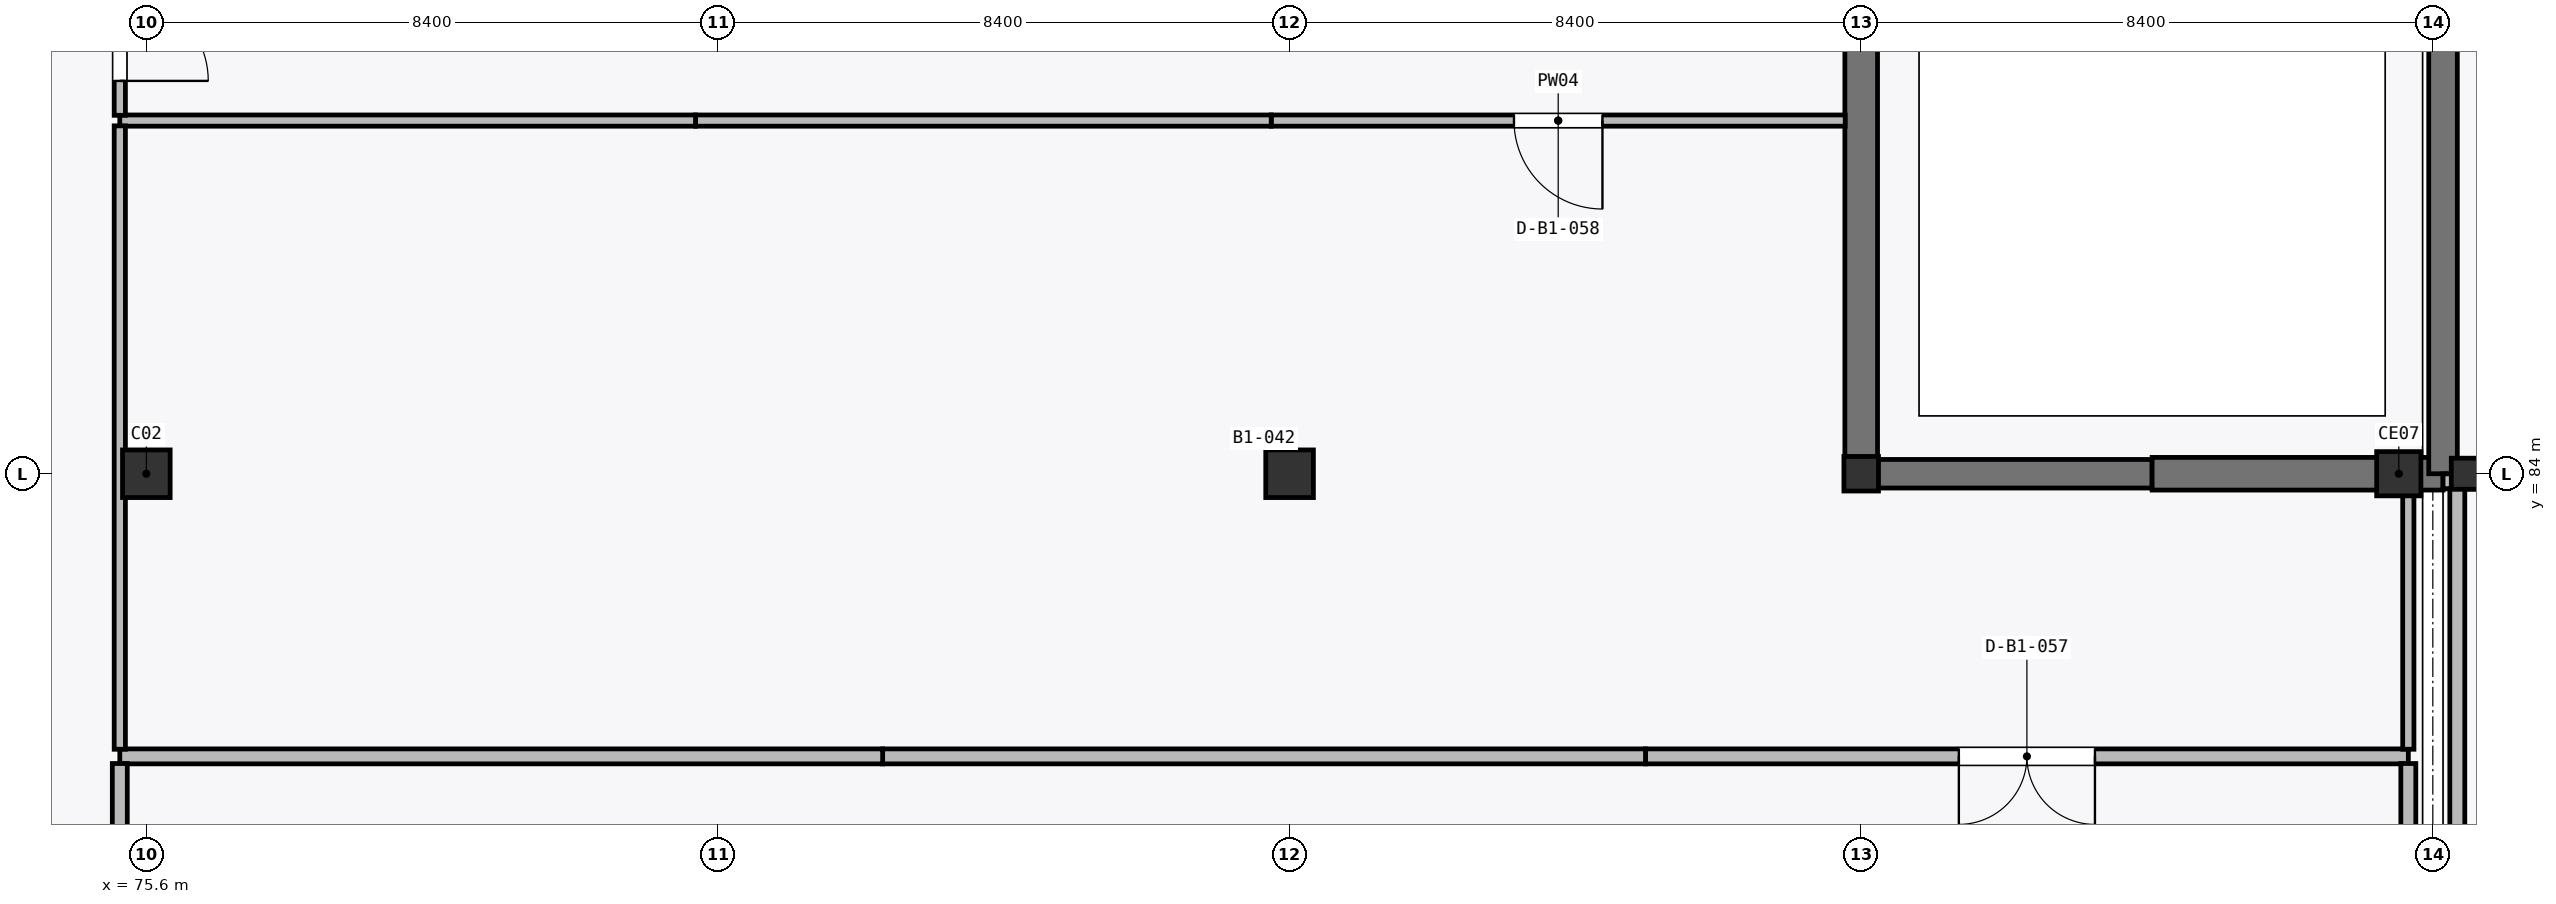
"""IFC4 building model, lengths in metres.
Left out: names, types, materials, properties, quantities, classifications, styles, units other than length and angle.
Written with IfcOpenShell. Run it as: python <this file> out.ifc"""

import sys

from ifc_helpers import new_model, si_unit, direction, frame, frame_2d, origin, origin_2d, place, context, subcontext, project, spatial, rectangle, hollow_rectangle, hollow_circle, extrude, element, fill, save


model = new_model("IFC4")
c1 = context("Model", 3, precision=1e-05, world=origin(), true_north=direction((0.0, 1.0)))
c2 = subcontext(c1, "Body", "Model", "MODEL_VIEW")
j1 = project(units=[si_unit("LENGTHUNIT", "METRE"), si_unit("PLANEANGLEUNIT", "RADIAN")], contexts=[c1])
p1 = place(None, origin())
s1 = spatial("IfcSite", under=j1, at=p1, CompositionType="ELEMENT")
p2 = place(p1, origin())
s2 = spatial("IfcBuilding", under=s1, at=p2, CompositionType="ELEMENT")
p3 = place(p2, frame((0.0, 0.0, -5.4)))
s3 = spatial("IfcBuildingStorey", under=s2, at=p3, CompositionType="ELEMENT", Elevation=-5.4)
for number, where, z_axis, x_axis in (
    (1, (75.6, 84.0, 0.0), (0.0, 0.0, 1.0), (1.0, 0.0, 0.0)),
    (2, (92.4, 84.0, 0.0), (0.0, 0.0, 1.0), (1.0, 0.0, 0.0)),
):
    element("IfcColumn", number, at=place(p3, frame(where, z_axis=z_axis, x_axis=x_axis)), inside=s3, PredefinedType="COLUMN", context=c2, shape_type="SweptSolid", body=[
        extrude(hollow_rectangle(XDim=0.7, YDim=0.7, WallThickness=0.026, at=origin_2d()), origin(), (0.0, 0.0, 1.0), 5.4),
    ])
p4 = place(p3, frame((100.8, 84.0, 0.0), z_axis=(0.0, 0.0, 1.0), x_axis=(1.0, 0.0, 0.0)))
e3 = element("IfcColumn", 3, at=p4, inside=s3, PredefinedType="COLUMN", context=c2, shape_type="SweptSolid", body=[
    extrude(hollow_circle(Radius=0.254, WallThickness=0.016, at=origin_2d()), origin(), (0.0, 0.0, 1.0), 5.4),
])
p5 = place(p3, frame((108.7, 84.0, 0.0), z_axis=(0.0, 0.0, 1.0), x_axis=(1.0, 0.0, 0.0)))
e4 = element("IfcColumn", 4, at=p5, inside=s3, PredefinedType="COLUMN", context=c2, shape_type="SweptSolid", body=[
    extrude(rectangle(XDim=0.65, YDim=0.65, at=origin_2d()), origin(), (0.0, 0.0, 1.0), 5.4),
])
p6 = place(p3, frame((109.7, 84.0, 0.0), z_axis=(0.0, 0.0, 1.0), x_axis=(1.0, 0.0, 0.0)))
e5 = element("IfcColumn", 5, at=p6, inside=s3, PredefinedType="COLUMN", context=c2, shape_type="SweptSolid", body=[
    extrude(hollow_circle(Radius=0.229, WallThickness=0.016, at=origin_2d()), origin(), (0.0, 0.0, 1.0), 5.4),
])
p7 = place(p3, frame((100.8, 92.4, 0.0), z_axis=(0.0, 0.0, 1.0), x_axis=(0.0, -1.0, 0.0)))
e6 = element("IfcWall", 6, at=p7, inside=s3, PredefinedType="USERDEFINED", context=c2, shape_type="SweptSolid", body=[
    extrude(rectangle(XDim=8.4, YDim=0.48, at=frame_2d((4.2, 0.0))), origin(), (0.0, 0.0, 1.0), 5.13),
])
p8 = place(p3, frame((100.8, 84.0, 0.0), z_axis=(0.0, 0.0, 1.0), x_axis=(1.0, 0.0, 0.0)))
e7 = element("IfcWall", 7, at=p8, inside=s3, PredefinedType="USERDEFINED", context=c2, shape_type="SweptSolid", body=[
    extrude(rectangle(XDim=4.275, YDim=0.42, at=frame_2d((2.137, 0.0))), origin(), (0.0, 0.0, 1.0), 5.13),
])
p9 = place(p3, frame((105.075, 84.0, 0.0), z_axis=(0.0, 0.0, 1.0), x_axis=(1.0, 0.0, 0.0)))
e8 = element("IfcWall", 8, at=p9, inside=s3, PredefinedType="USERDEFINED", context=c2, shape_type="SweptSolid", body=[
    extrude(rectangle(XDim=4.275, YDim=0.48, at=frame_2d((2.138, 0.0))), origin(), (0.0, 0.0, 1.0), 5.13),
])
p10 = place(p3, frame((109.35, 84.0, 0.0), z_axis=(0.0, 0.0, 1.0), x_axis=(0.0, 1.0, 0.0)))
e9 = element("IfcWall", 9, at=p10, inside=s3, PredefinedType="USERDEFINED", context=c2, shape_type="SweptSolid", body=[
    extrude(rectangle(XDim=6.9, YDim=0.42, at=frame_2d((3.45, 0.0))), origin(), (0.0, 0.0, 1.0), 5.13),
])
p11 = place(p3, frame((108.84, 79.846, 0.0), z_axis=(0.0, 0.0, 1.0), x_axis=(-1.0, 0.0, 0.0)))
e10 = element("IfcWall", 10, at=p11, inside=s3, PredefinedType="PARTITIONING", context=c2, shape_type="SweptSolid", body=[
    extrude(rectangle(XDim=11.21, YDim=0.22, at=frame_2d((5.605, 0.0))), origin(), (0.0, 0.0, 1.0), 5.145),
])
p12 = place(p11, frame((4.605, 0.0, 0.0)))
e11 = element("IfcOpeningElement", 11, at=p12, cuts=e10, PredefinedType="OPENING", context=c2, shape_type="SweptSolid", body=[
    extrude(rectangle(XDim=2.0, YDim=2.2, at=frame_2d((1.0, 1.1))), frame((0.0, 0.12, 0.0), z_axis=(0.0, -1.0, 0.0), x_axis=(1.0, 0.0, 0.0)), (0.0, 0.0, 1.0), 0.24),
])
for number, where, z_axis, x_axis in (
    (12, (97.63, 79.846, 0.0), (0.0, 0.0, 1.0), (-1.0, 0.0, 0.0)),
    (13, (86.42, 79.846, 0.0), (0.0, 0.0, 1.0), (-1.0, 0.0, 0.0)),
):
    element("IfcWall", number, at=place(p3, frame(where, z_axis=z_axis, x_axis=x_axis)), inside=s3, PredefinedType="PARTITIONING", context=c2, shape_type="SweptSolid", body=[
        extrude(rectangle(XDim=11.21, YDim=0.22, at=frame_2d((5.605, 0.0))), origin(), (0.0, 0.0, 1.0), 5.145),
    ])
p13 = place(p3, frame((75.21, 79.741, 0.0), z_axis=(0.0, 0.0, 1.0), x_axis=(0.0, -1.0, 0.0)))
e14 = element("IfcWall", 14, at=p13, inside=s3, PredefinedType="PARTITIONING", context=c2, shape_type="SweptSolid", body=[
    extrude(rectangle(XDim=8.213, YDim=0.22, at=frame_2d((4.106, 0.0))), origin(), (0.0, 0.0, 1.0), 5.145),
])
p14 = place(p3, frame((108.84, 68.58, 0.0), z_axis=(0.0, 0.0, 1.0), x_axis=(0.0, 1.0, 0.0)))
e15 = element("IfcWall", 15, at=p14, inside=s3, PredefinedType="PARTITIONING", context=c2, shape_type="SweptSolid", body=[
    extrude(rectangle(XDim=11.161, YDim=0.22, at=frame_2d((5.581, 0.0))), origin(), (0.0, 0.0, 1.0), 4.682),
])
p15 = place(p3, frame((100.565, 89.19, 0.0), z_axis=(0.0, 0.0, 1.0), x_axis=(-1.0, 0.0, 0.0)))
e16 = element("IfcWall", 16, at=p15, inside=s3, PredefinedType="PARTITIONING", context=c2, shape_type="SweptSolid", body=[
    extrude(rectangle(XDim=8.435, YDim=0.165, at=frame_2d((4.218, 0.0))), origin(), (0.0, 0.0, 1.0), 5.145),
])
p16 = place(p15, frame((3.567, 0.0, 0.0)))
e17 = element("IfcOpeningElement", 17, at=p16, cuts=e16, PredefinedType="OPENING", context=c2, shape_type="SweptSolid", body=[
    extrude(rectangle(XDim=1.3, YDim=2.2, at=frame_2d((0.65, 1.1))), frame((0.0, 0.093, 0.0), z_axis=(0.0, -1.0, 0.0), x_axis=(1.0, 0.0, 0.0)), (0.0, 0.0, 1.0), 0.185),
])
for number, where, z_axis, x_axis in (
    (18, (92.13, 89.19, 0.0), (0.0, 0.0, 1.0), (-1.0, 0.0, 0.0)),
    (19, (83.67, 89.19, 0.0), (0.0, 0.0, 1.0), (-1.0, 0.0, 0.0)),
):
    element("IfcWall", number, at=place(p3, frame(where, z_axis=z_axis, x_axis=x_axis)), inside=s3, PredefinedType="PARTITIONING", context=c2, shape_type="SweptSolid", body=[
        extrude(rectangle(XDim=8.46, YDim=0.165, at=frame_2d((4.23, 0.0))), origin(), (0.0, 0.0, 1.0), 5.145),
    ])
p17 = place(p3, frame((75.21, 89.113, 0.0), z_axis=(0.0, 0.0, 1.0), x_axis=(0.0, -1.0, 0.0)))
e20 = element("IfcWall", 20, at=p17, inside=s3, PredefinedType="PARTITIONING", context=c2, shape_type="SweptSolid", body=[
    extrude(rectangle(XDim=9.161, YDim=0.165, at=frame_2d((4.581, 0.0))), origin(), (0.0, 0.0, 1.0), 5.145),
])
p18 = place(p3, frame((108.84, 79.951, 0.0), z_axis=(0.0, 0.0, 1.0), x_axis=(0.0, 1.0, 0.0)))
e21 = element("IfcWall", 21, at=p18, inside=s3, PredefinedType="PARTITIONING", context=c2, shape_type="SweptSolid", body=[
    extrude(rectangle(XDim=3.813, YDim=0.165, at=frame_2d((1.907, 0.0))), origin(), (0.0, 0.0, 1.0), 4.682),
])
p19 = place(p3, frame((75.21, 93.89, 0.0), z_axis=(0.0, 0.0, 1.0), x_axis=(0.0, -1.0, 0.0)))
e22 = element("IfcWall", 22, at=p19, inside=s3, PredefinedType="PARTITIONING", context=c2, shape_type="SweptSolid", body=[
    extrude(rectangle(XDim=4.622, YDim=0.165, at=frame_2d((2.311, 0.0))), origin(), (0.0, 0.0, 1.0), 5.145),
])
p20 = place(p19, frame((2.817, 0.0, 0.0)))
e23 = element("IfcOpeningElement", 23, at=p20, cuts=e22, PredefinedType="OPENING", context=c2, shape_type="SweptSolid", body=[
    extrude(rectangle(XDim=1.3, YDim=2.2, at=frame_2d((0.65, 1.1))), frame((0.0, 0.093, 0.0), z_axis=(0.0, -1.0, 0.0), x_axis=(1.0, 0.0, 0.0)), (0.0, 0.0, 1.0), 0.185),
])
p21 = place(p3, frame((112.54, 83.888, 0.0), z_axis=(0.0, 0.0, 1.0), x_axis=(-1.0, 0.0, 0.0)))
e24 = element("IfcWall", 24, at=p21, inside=s3, PredefinedType="PARTITIONING", context=c2, shape_type="SweptSolid", body=[
    extrude(rectangle(XDim=3.19, YDim=0.22, at=frame_2d((1.595, 0.0))), origin(), (0.0, 0.0, 1.0), 4.422),
])
p22 = place(p3, frame((109.56, 83.783, 0.0), z_axis=(0.0, 0.0, 1.0), x_axis=(0.0, -1.0, 0.0)))
e25 = element("IfcWall", 25, at=p22, inside=s3, PredefinedType="PARTITIONING", context=c2, shape_type="SweptSolid", body=[
    extrude(rectangle(XDim=9.021, YDim=0.22, at=frame_2d((4.51, 0.0))), origin(), (0.0, 0.0, 1.0), 4.772),
])
p23 = place(p12, origin())
e26 = element("IfcDoor", 26, at=p23, inside=s3, OperationType="DOUBLE_DOOR_SINGLE_SWING", PredefinedType="DOOR", context=c2, shape_type="SweptSolid", body=[
    extrude(rectangle(XDim=2.0, YDim=2.2, at=frame_2d((1.0, 1.1))), frame((0.0, 0.025, 0.0), z_axis=(0.0, -1.0, 0.0), x_axis=(1.0, 0.0, 0.0)), (0.0, 0.0, 1.0), 0.05),
])
fill(e11, e26)
p24 = place(p16, origin())
e27 = element("IfcDoor", 27, at=p24, inside=s3, OperationType="SINGLE_SWING_LEFT", PredefinedType="DOOR", context=c2, shape_type="SweptSolid", body=[
    extrude(rectangle(XDim=1.3, YDim=2.2, at=frame_2d((0.65, 1.1))), frame((0.0, 0.025, 0.0), z_axis=(0.0, -1.0, 0.0), x_axis=(1.0, 0.0, 0.0)), (0.0, 0.0, 1.0), 0.05),
])
fill(e17, e27)
p25 = place(p20, origin())
e28 = element("IfcDoor", 28, at=p25, inside=s3, OperationType="SINGLE_SWING_RIGHT", PredefinedType="DOOR", context=c2, shape_type="SweptSolid", body=[
    extrude(rectangle(XDim=1.3, YDim=2.2, at=frame_2d((0.65, 1.1))), frame((0.0, 0.025, 0.0), z_axis=(0.0, -1.0, 0.0), x_axis=(1.0, 0.0, 0.0)), (0.0, 0.0, 1.0), 0.05),
])
fill(e23, e28)
save(model, sys.argv[1])
